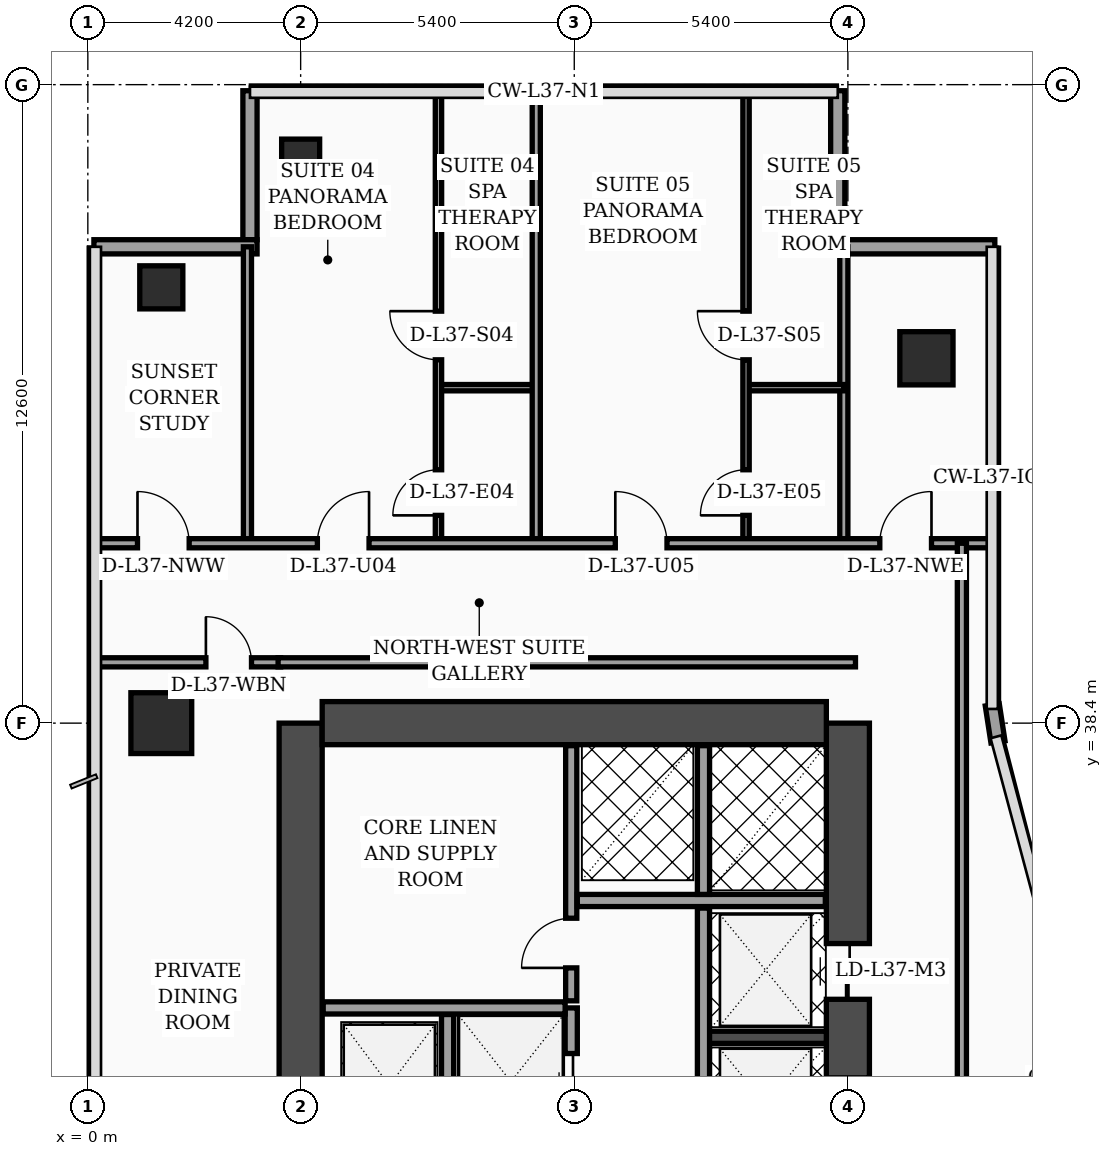
"""IFC4 building model, lengths in metres.
Left out: names, types, materials, properties, quantities, classifications, styles, units other than length and angle.
Written with IfcOpenShell. Run it as: python <this file> out.ifc"""

import sys

from ifc_helpers import new_model, si_unit, direction, frame, frame_2d, origin, origin_2d, place, context, subcontext, project, spatial, rectangle, hollow_rectangle, extrude, element, fill, save


model = new_model("IFC4")
c1 = context("Model", 3, precision=1e-05, world=origin(), true_north=direction((0.0, 1.0)))
c2 = subcontext(c1, "Body", "Model", "MODEL_VIEW")
j1 = project(units=[si_unit("LENGTHUNIT", "METRE"), si_unit("PLANEANGLEUNIT", "RADIAN")], contexts=[c1])
p1 = place(None, origin())
s1 = spatial("IfcSite", under=j1, at=p1, CompositionType="ELEMENT")
p2 = place(p1, origin())
s2 = spatial("IfcBuilding", under=s1, at=p2, CompositionType="ELEMENT")
p3 = place(p2, frame((0.0, 0.0, 152.3)))
s3 = spatial("IfcBuildingStorey", under=s2, at=p3, CompositionType="ELEMENT", Elevation=152.3)
p4 = place(p3, frame((4.2, 16.8, 0.0), z_axis=(0.0, 0.0, 1.0), x_axis=(0.0, 1.0, 0.0)))
e1 = element("IfcWall", 1, at=p4, inside=s3, PredefinedType="SHEAR", context=c2, shape_type="SweptSolid", body=[
    extrude(rectangle(XDim=21.6, YDim=0.85, at=frame_2d((10.8, 0.0))), origin(), (0.0, 0.0, 1.0), 3.56),
])
p5 = place(p3, frame((15.0, 16.8, 0.0), z_axis=(0.0, 0.0, 1.0), x_axis=(0.0, 1.0, 0.0)))
e2 = element("IfcWall", 2, at=p5, inside=s3, PredefinedType="SHEAR", context=c2, shape_type="SweptSolid", body=[
    extrude(rectangle(XDim=21.6, YDim=0.85, at=frame_2d((10.8, 0.0))), origin(), (0.0, 0.0, 1.0), 3.56),
])
p6 = place(p5, frame((8.65, 0.0, 0.0)))
e3 = element("IfcOpeningElement", 3, at=p6, cuts=e2, PredefinedType="OPENING", context=c2, shape_type="SweptSolid", body=[
    extrude(rectangle(XDim=1.1, YDim=2.2, at=frame_2d((0.55, 1.1))), frame((0.0, 0.435, 0.0), z_axis=(0.0, -1.0, 0.0), x_axis=(1.0, 0.0, 0.0)), (0.0, 0.0, 1.0), 0.87),
])
p7 = place(p5, frame((10.85, 0.0, 0.0)))
e4 = element("IfcOpeningElement", 4, at=p7, cuts=e2, PredefinedType="OPENING", context=c2, shape_type="SweptSolid", body=[
    extrude(rectangle(XDim=1.1, YDim=2.2, at=frame_2d((0.55, 1.1))), frame((0.0, 0.435, 0.0), z_axis=(0.0, -1.0, 0.0), x_axis=(1.0, 0.0, 0.0)), (0.0, 0.0, 1.0), 0.87),
])
p8 = place(p5, frame((13.5, 0.0, 0.0)))
e5 = element("IfcOpeningElement", 5, at=p8, cuts=e2, PredefinedType="OPENING", context=c2, shape_type="SweptSolid", body=[
    extrude(rectangle(XDim=1.1, YDim=2.2, at=frame_2d((0.55, 1.1))), frame((0.0, 0.435, 0.0), z_axis=(0.0, -1.0, 0.0), x_axis=(1.0, 0.0, 0.0)), (0.0, 0.0, 1.0), 0.87),
])
p9 = place(p5, frame((16.15, 0.0, 0.0)))
e6 = element("IfcOpeningElement", 6, at=p9, cuts=e2, PredefinedType="OPENING", context=c2, shape_type="SweptSolid", body=[
    extrude(rectangle(XDim=1.1, YDim=2.2, at=frame_2d((0.55, 1.1))), frame((0.0, 0.435, 0.0), z_axis=(0.0, -1.0, 0.0), x_axis=(1.0, 0.0, 0.0)), (0.0, 0.0, 1.0), 0.87),
])
p10 = place(p3, frame((4.625, 38.4, 0.0), z_axis=(0.0, 0.0, 1.0), x_axis=(1.0, 0.0, 0.0)))
e7 = element("IfcWall", 7, at=p10, inside=s3, PredefinedType="SHEAR", context=c2, shape_type="SweptSolid", body=[
    extrude(rectangle(XDim=9.95, YDim=0.85, at=frame_2d((4.975, 0.0))), origin(), (0.0, 0.0, 1.0), 3.56),
])
p11 = place(p3, frame((12.18, 32.2, 0.0), z_axis=(0.0, 0.0, 1.0), x_axis=(1.0, 0.0, 0.0)))
e8 = element("IfcWall", 8, at=p11, inside=s3, PredefinedType="SOLIDWALL", context=c2, shape_type="SweptSolid", body=[
    extrude(rectangle(XDim=2.395, YDim=0.24, at=frame_2d((1.198, 0.0))), origin(), (0.0, 0.0, 1.0), 3.56),
])
p12 = place(p3, frame((1.45, 38.4, 0.0), z_axis=(0.0, 0.0, 1.0), x_axis=(1.0, 0.0, 0.0)))
e9 = element("IfcColumn", 9, at=p12, inside=s3, PredefinedType="COLUMN", context=c2, shape_type="SweptSolid", body=[
    extrude(rectangle(XDim=1.2, YDim=1.2, at=origin_2d()), origin(), (0.0, 0.0, 1.0), 3.56),
])
p13 = place(p3, frame((1.45, 47.0, 0.0), z_axis=(0.0, 0.0, 1.0), x_axis=(1.0, 0.0, 0.0)))
e10 = element("IfcColumn", 10, at=p13, inside=s3, PredefinedType="COLUMN", context=c2, shape_type="SweptSolid", body=[
    extrude(hollow_rectangle(XDim=0.85, YDim=0.85, WallThickness=0.036, at=origin_2d()), origin(), (0.0, 0.0, 1.0), 3.56),
])
p14 = place(p3, frame((4.2, 49.55, 0.0), z_axis=(0.0, 0.0, 1.0), x_axis=(1.0, 0.0, 0.0)))
e11 = element("IfcColumn", 11, at=p14, inside=s3, PredefinedType="COLUMN", context=c2, shape_type="SweptSolid", body=[
    extrude(hollow_rectangle(XDim=0.75, YDim=0.75, WallThickness=0.032, at=origin_2d()), origin(), (0.0, 0.0, 1.0), 3.56),
])
p15 = place(p3, frame((16.55, 45.6, 0.0), z_axis=(0.0, 0.0, 1.0), x_axis=(1.0, 0.0, 0.0)))
e12 = element("IfcColumn", 12, at=p15, inside=s3, PredefinedType="COLUMN", context=c2, shape_type="SweptSolid", body=[
    extrude(rectangle(XDim=1.05, YDim=1.05, at=origin_2d()), origin(), (0.0, 0.0, 1.0), 3.56),
])
p16 = place(p3, frame((17.962, 38.03, 0.0), z_axis=(0.0, 0.0, 1.0), x_axis=(-0.15141125477, 0.988470855377, 0.0)))
e13 = element("IfcWall", 13, at=p16, inside=s3, PredefinedType="SOLIDWALL", context=c2, shape_type="SweptSolid", body=[
    extrude(rectangle(XDim=0.739, YDim=0.28, at=frame_2d((0.369, 0.0))), origin(), (0.0, 0.0, 1.0), 3.56),
])
p17 = place(p3, frame((17.9, 47.8, 0.0), z_axis=(0.0, 0.0, 1.0), x_axis=(-1.0, 0.0, 0.0)))
e14 = element("IfcWall", 14, at=p17, inside=s3, PredefinedType="SOLIDWALL", context=c2, shape_type="SweptSolid", body=[
    extrude(rectangle(XDim=3.24, YDim=0.28, at=frame_2d((1.62, 0.0))), origin(), (0.0, 0.0, 1.0), 3.56),
])
p18 = place(p3, frame((14.8, 47.94, 0.0), z_axis=(0.0, 0.0, 1.0), x_axis=(0.0, 1.0, 0.0)))
e15 = element("IfcWall", 15, at=p18, inside=s3, PredefinedType="SOLIDWALL", context=c2, shape_type="SweptSolid", body=[
    extrude(rectangle(XDim=2.94, YDim=0.28, at=frame_2d((1.47, 0.0))), origin(), (0.0, 0.0, 1.0), 3.56),
])
p19 = place(p3, frame((3.2, 50.88, 0.0), z_axis=(0.0, 0.0, 1.0), x_axis=(0.0, -1.0, 0.0)))
e16 = element("IfcWall", 16, at=p19, inside=s3, PredefinedType="SOLIDWALL", context=c2, shape_type="SweptSolid", body=[
    extrude(rectangle(XDim=2.94, YDim=0.28, at=frame_2d((1.47, 0.0))), origin(), (0.0, 0.0, 1.0), 3.04),
])
p20 = place(p3, frame((3.34, 47.8, 0.0), z_axis=(0.0, 0.0, 1.0), x_axis=(-1.0, 0.0, 0.0)))
e17 = element("IfcWall", 17, at=p20, inside=s3, PredefinedType="SOLIDWALL", context=c2, shape_type="SweptSolid", body=[
    extrude(rectangle(XDim=3.22, YDim=0.28, at=frame_2d((1.61, 0.0))), origin(), (0.0, 0.0, 1.0), 3.04),
])
p21 = place(p3, frame((7.1, 30.02, 0.0), z_axis=(0.0, 0.0, 1.0), x_axis=(0.0, 1.0, 0.0)))
e18 = element("IfcWall", 18, at=p21, inside=s3, PredefinedType="SOLIDWALL", context=c2, shape_type="SweptSolid", body=[
    extrude(rectangle(XDim=2.63, YDim=0.24, at=frame_2d((1.315, 0.0))), origin(), (0.0, 0.0, 1.0), 3.56),
])
p22 = place(p3, frame((9.54, 29.88, 0.0), z_axis=(0.0, 0.0, 1.0), x_axis=(0.0, 1.0, 0.0)))
e19 = element("IfcWall", 19, at=p22, inside=s3, PredefinedType="SOLIDWALL", context=c2, shape_type="SweptSolid", body=[
    extrude(rectangle(XDim=2.9, YDim=0.24, at=frame_2d((1.45, 0.0))), origin(), (0.0, 0.0, 1.0), 3.56),
])
p23 = place(p22, frame((0.7, 0.0, 0.0)))
e20 = element("IfcOpeningElement", 20, at=p23, cuts=e19, PredefinedType="OPENING", context=c2, shape_type="SweptSolid", body=[
    extrude(rectangle(XDim=1.3, YDim=2.35, at=frame_2d((0.65, 1.175))), frame((0.0, 0.13, 0.0), z_axis=(0.0, -1.0, 0.0), x_axis=(1.0, 0.0, 0.0)), (0.0, 0.0, 1.0), 0.26),
])
p24 = place(p3, frame((4.645, 32.78, 0.0), z_axis=(0.0, 0.0, 1.0), x_axis=(1.0, 0.0, 0.0)))
e21 = element("IfcWall", 21, at=p24, inside=s3, PredefinedType="SOLIDWALL", context=c2, shape_type="SweptSolid", body=[
    extrude(rectangle(XDim=4.775, YDim=0.24, at=frame_2d((2.387, 0.0))), origin(), (0.0, 0.0, 1.0), 3.19),
])
p25 = place(p3, frame((9.54, 32.92, 0.0), z_axis=(0.0, 0.0, 1.0), x_axis=(0.0, 1.0, 0.0)))
e22 = element("IfcWall", 22, at=p25, inside=s3, PredefinedType="SOLIDWALL", context=c2, shape_type="SweptSolid", body=[
    extrude(rectangle(XDim=5.035, YDim=0.22, at=frame_2d((2.518, 0.0))), origin(), (0.0, 0.0, 1.0), 3.56),
])
p26 = place(p25, frame((0.65, 0.0, 0.0)))
e23 = element("IfcOpeningElement", 23, at=p26, cuts=e22, PredefinedType="OPENING", context=c2, shape_type="SweptSolid", body=[
    extrude(rectangle(XDim=0.98, YDim=2.15, at=frame_2d((0.49, 1.075))), frame((0.0, 0.12, 0.0), z_axis=(0.0, -1.0, 0.0), x_axis=(1.0, 0.0, 0.0)), (0.0, 0.0, 1.0), 0.24),
])
p27 = place(p3, frame((12.15, 27.0, 0.0), z_axis=(0.0, 0.0, 1.0), x_axis=(0.0, 1.0, 0.0)))
e24 = element("IfcWall", 24, at=p27, inside=s3, PredefinedType="SOLIDWALL", context=c2, shape_type="SweptSolid", body=[
    extrude(rectangle(XDim=7.75, YDim=0.24, at=frame_2d((3.875, 0.0))), origin(), (0.0, 0.0, 1.0), 3.56),
])
p28 = place(p3, frame((9.66, 34.9, 0.0), z_axis=(0.0, 0.0, 1.0), x_axis=(1.0, 0.0, 0.0)))
e25 = element("IfcWall", 25, at=p28, inside=s3, PredefinedType="SOLIDWALL", context=c2, shape_type="SweptSolid", body=[
    extrude(rectangle(XDim=4.895, YDim=0.24, at=frame_2d((2.448, 0.0))), origin(), (0.0, 0.0, 1.0), 3.56),
])
p29 = place(p3, frame((12.15, 35.02, 0.0), z_axis=(0.0, 0.0, 1.0), x_axis=(0.0, 1.0, 0.0)))
e26 = element("IfcWall", 26, at=p29, inside=s3, PredefinedType="SOLIDWALL", context=c2, shape_type="SweptSolid", body=[
    extrude(rectangle(XDim=2.935, YDim=0.24, at=frame_2d((1.468, 0.0))), origin(), (0.0, 0.0, 1.0), 3.56),
])
p30 = place(p3, frame((0.08, 39.6, 0.0), z_axis=(0.0, 0.0, 1.0), x_axis=(1.0, 0.0, 0.0)))
e27 = element("IfcWall", 27, at=p30, inside=s3, PredefinedType="PARTITIONING", context=c2, shape_type="SweptSolid", body=[
    extrude(rectangle(XDim=3.725, YDim=0.18, at=frame_2d((1.862, 0.0))), origin(), (0.0, 0.0, 1.0), 2.94),
])
p31 = place(p30, frame((2.25, 0.0, 0.0)))
e28 = element("IfcOpeningElement", 28, at=p31, cuts=e27, PredefinedType="OPENING", context=c2, shape_type="SweptSolid", body=[
    extrude(rectangle(XDim=0.9, YDim=2.15, at=frame_2d((0.45, 1.075))), frame((0.0, 0.1, 0.0), z_axis=(0.0, -1.0, 0.0), x_axis=(1.0, 0.0, 0.0)), (0.0, 0.0, 1.0), 0.2),
])
p32 = place(p3, frame((3.15, 41.95, 0.0), z_axis=(0.0, 0.0, 1.0), x_axis=(0.0, 1.0, 0.0)))
e29 = element("IfcWall", 29, at=p32, inside=s3, PredefinedType="PARTITIONING", context=c2, shape_type="SweptSolid", body=[
    extrude(rectangle(XDim=5.85, YDim=0.16, at=frame_2d((2.925, 0.0))), origin(), (0.0, 0.0, 1.0), 3.14),
])
p33 = place(p3, frame((14.92, 41.95, 0.0), z_axis=(0.0, 0.0, 1.0), x_axis=(0.0, 1.0, 0.0)))
e30 = element("IfcWall", 30, at=p33, inside=s3, PredefinedType="PARTITIONING", context=c2, shape_type="SweptSolid", body=[
    extrude(rectangle(XDim=5.85, YDim=0.16, at=frame_2d((2.925, 0.0))), origin(), (0.0, 0.0, 1.0), 3.04),
])
p34 = place(p3, frame((6.92, 45.02, 0.0), z_axis=(0.0, 0.0, 1.0), x_axis=(1.0, 0.0, 0.0)))
e31 = element("IfcWall", 31, at=p34, inside=s3, PredefinedType="PARTITIONING", context=c2, shape_type="SweptSolid", body=[
    extrude(rectangle(XDim=1.93, YDim=0.125, at=frame_2d((0.965, 0.0))), origin(), (0.0, 0.0, 1.0), 3.56),
])
p35 = place(p3, frame((6.92, 41.95, 0.0), z_axis=(0.0, 0.0, 1.0), x_axis=(0.0, 1.0, 0.0)))
e32 = element("IfcWall", 32, at=p35, inside=s3, PredefinedType="PARTITIONING", context=c2, shape_type="SweptSolid", body=[
    extrude(rectangle(XDim=8.99, YDim=0.125, at=frame_2d((4.495, 0.0))), origin(), (0.0, 0.0, 1.0), 3.04),
])
p36 = place(p35, frame((0.55, 0.0, 0.0)))
e33 = element("IfcOpeningElement", 33, at=p36, cuts=e32, PredefinedType="OPENING", context=c2, shape_type="SweptSolid", body=[
    extrude(rectangle(XDim=0.9, YDim=2.15, at=frame_2d((0.45, 1.075))), frame((0.0, 0.073, 0.0), z_axis=(0.0, -1.0, 0.0), x_axis=(1.0, 0.0, 0.0)), (0.0, 0.0, 1.0), 0.145),
])
p37 = place(p35, frame((3.62, 0.0, 0.0)))
e34 = element("IfcOpeningElement", 34, at=p37, cuts=e32, PredefinedType="OPENING", context=c2, shape_type="SweptSolid", body=[
    extrude(rectangle(XDim=0.96, YDim=2.2, at=frame_2d((0.48, 1.1))), frame((0.0, 0.073, 0.0), z_axis=(0.0, -1.0, 0.0), x_axis=(1.0, 0.0, 0.0)), (0.0, 0.0, 1.0), 0.145),
])
p38 = place(p3, frame((12.99, 45.02, 0.0), z_axis=(0.0, 0.0, 1.0), x_axis=(1.0, 0.0, 0.0)))
e35 = element("IfcWall", 35, at=p38, inside=s3, PredefinedType="PARTITIONING", context=c2, shape_type="SweptSolid", body=[
    extrude(rectangle(XDim=1.93, YDim=0.125, at=frame_2d((0.965, 0.0))), origin(), (0.0, 0.0, 1.0), 3.56),
])
p39 = place(p3, frame((12.99, 41.95, 0.0), z_axis=(0.0, 0.0, 1.0), x_axis=(0.0, 1.0, 0.0)))
e36 = element("IfcWall", 36, at=p39, inside=s3, PredefinedType="PARTITIONING", context=c2, shape_type="SweptSolid", body=[
    extrude(rectangle(XDim=8.99, YDim=0.125, at=frame_2d((4.495, 0.0))), origin(), (0.0, 0.0, 1.0), 3.04),
])
p40 = place(p39, frame((0.55, 0.0, 0.0)))
e37 = element("IfcOpeningElement", 37, at=p40, cuts=e36, PredefinedType="OPENING", context=c2, shape_type="SweptSolid", body=[
    extrude(rectangle(XDim=0.9, YDim=2.15, at=frame_2d((0.45, 1.075))), frame((0.0, 0.073, 0.0), z_axis=(0.0, -1.0, 0.0), x_axis=(1.0, 0.0, 0.0)), (0.0, 0.0, 1.0), 0.145),
])
p41 = place(p39, frame((3.62, 0.0, 0.0)))
e38 = element("IfcOpeningElement", 38, at=p41, cuts=e36, PredefinedType="OPENING", context=c2, shape_type="SweptSolid", body=[
    extrude(rectangle(XDim=0.96, YDim=2.2, at=frame_2d((0.48, 1.1))), frame((0.0, 0.073, 0.0), z_axis=(0.0, -1.0, 0.0), x_axis=(1.0, 0.0, 0.0)), (0.0, 0.0, 1.0), 0.145),
])
p42 = place(p3, frame((8.85, 41.95, 0.0), z_axis=(0.0, 0.0, 1.0), x_axis=(0.0, 1.0, 0.0)))
e39 = element("IfcWall", 39, at=p42, inside=s3, PredefinedType="PARTITIONING", context=c2, shape_type="SweptSolid", body=[
    extrude(rectangle(XDim=8.99, YDim=0.16, at=frame_2d((4.495, 0.0))), origin(), (0.0, 0.0, 1.0), 3.04),
])
p43 = place(p3, frame((0.08, 41.95, 0.0), z_axis=(0.0, 0.0, 1.0), x_axis=(1.0, 0.0, 0.0)))
e40 = element("IfcWall", 40, at=p43, inside=s3, PredefinedType="PARTITIONING", context=c2, shape_type="SweptSolid", body=[
    extrude(rectangle(XDim=17.77, YDim=0.18, at=frame_2d((8.885, 0.0))), origin(), (0.0, 0.0, 1.0), 2.94),
])
p44 = place(p43, frame((0.9, 0.0, 0.0)))
e41 = element("IfcOpeningElement", 41, at=p44, cuts=e40, PredefinedType="OPENING", context=c2, shape_type="SweptSolid", body=[
    extrude(rectangle(XDim=1.02, YDim=2.2, at=frame_2d((0.51, 1.1))), frame((0.0, 0.1, 0.0), z_axis=(0.0, -1.0, 0.0), x_axis=(1.0, 0.0, 0.0)), (0.0, 0.0, 1.0), 0.2),
])
p45 = place(p43, frame((4.45, 0.0, 0.0)))
e42 = element("IfcOpeningElement", 42, at=p45, cuts=e40, PredefinedType="OPENING", context=c2, shape_type="SweptSolid", body=[
    extrude(rectangle(XDim=1.02, YDim=2.2, at=frame_2d((0.51, 1.1))), frame((0.0, 0.1, 0.0), z_axis=(0.0, -1.0, 0.0), x_axis=(1.0, 0.0, 0.0)), (0.0, 0.0, 1.0), 0.2),
])
p46 = place(p43, frame((10.33, 0.0, 0.0)))
e43 = element("IfcOpeningElement", 43, at=p46, cuts=e40, PredefinedType="OPENING", context=c2, shape_type="SweptSolid", body=[
    extrude(rectangle(XDim=1.02, YDim=2.2, at=frame_2d((0.51, 1.1))), frame((0.0, 0.1, 0.0), z_axis=(0.0, -1.0, 0.0), x_axis=(1.0, 0.0, 0.0)), (0.0, 0.0, 1.0), 0.2),
])
p47 = place(p43, frame((15.55, 0.0, 0.0)))
e44 = element("IfcOpeningElement", 44, at=p47, cuts=e40, PredefinedType="OPENING", context=c2, shape_type="SweptSolid", body=[
    extrude(rectangle(XDim=1.02, YDim=2.2, at=frame_2d((0.51, 1.1))), frame((0.0, 0.1, 0.0), z_axis=(0.0, -1.0, 0.0), x_axis=(1.0, 0.0, 0.0)), (0.0, 0.0, 1.0), 0.2),
])
p48 = place(p3, frame((17.25, 24.3, 0.0), z_axis=(0.0, 0.0, 1.0), x_axis=(0.0, 1.0, 0.0)))
e45 = element("IfcWall", 45, at=p48, inside=s3, PredefinedType="PARTITIONING", context=c2, shape_type="SweptSolid", body=[
    extrude(rectangle(XDim=17.65, YDim=0.18, at=frame_2d((8.825, 0.0))), origin(), (0.0, 0.0, 1.0), 2.94),
])
p49 = place(p3, frame((3.755, 39.6, 0.0), z_axis=(0.0, 0.0, 1.0), x_axis=(1.0, 0.0, 0.0)))
e46 = element("IfcWall", 46, at=p49, inside=s3, PredefinedType="PARTITIONING", context=c2, shape_type="SweptSolid", body=[
    extrude(rectangle(XDim=11.395, YDim=0.18, at=frame_2d((5.698, 0.0))), origin(), (0.0, 0.0, 1.0), 2.94),
])
p50 = place(p23, origin())
e47 = element("IfcDoor", 47, at=p50, inside=s3, OperationType="DOUBLE_DOOR_SLIDING", PredefinedType="DOOR", context=c2, shape_type="SweptSolid", body=[
    extrude(rectangle(XDim=1.3, YDim=2.35, at=frame_2d((0.65, 1.175))), frame((0.0, 0.025, 0.0), z_axis=(0.0, -1.0, 0.0), x_axis=(1.0, 0.0, 0.0)), (0.0, 0.0, 1.0), 0.05),
])
fill(e20, e47)
p51 = place(p26, origin())
e48 = element("IfcDoor", 48, at=p51, inside=s3, OperationType="SINGLE_SWING_LEFT", PredefinedType="DOOR", context=c2, shape_type="SweptSolid", body=[
    extrude(rectangle(XDim=0.98, YDim=2.15, at=frame_2d((0.49, 1.075))), frame((0.0, 0.025, 0.0), z_axis=(0.0, -1.0, 0.0), x_axis=(1.0, 0.0, 0.0)), (0.0, 0.0, 1.0), 0.05),
])
fill(e23, e48)
p52 = place(p31, origin())
e49 = element("IfcDoor", 49, at=p52, inside=s3, OperationType="SINGLE_SWING_LEFT", PredefinedType="DOOR", context=c2, shape_type="SweptSolid", body=[
    extrude(rectangle(XDim=0.9, YDim=2.15, at=frame_2d((0.45, 1.075))), frame((0.0, 0.025, 0.0), z_axis=(0.0, -1.0, 0.0), x_axis=(1.0, 0.0, 0.0)), (0.0, 0.0, 1.0), 0.05),
])
fill(e28, e49)
p53 = place(p36, origin())
e50 = element("IfcDoor", 50, at=p53, inside=s3, OperationType="SINGLE_SWING_LEFT", PredefinedType="DOOR", context=c2, shape_type="SweptSolid", body=[
    extrude(rectangle(XDim=0.9, YDim=2.15, at=frame_2d((0.45, 1.075))), frame((0.0, 0.025, 0.0), z_axis=(0.0, -1.0, 0.0), x_axis=(1.0, 0.0, 0.0)), (0.0, 0.0, 1.0), 0.05),
])
fill(e33, e50)
p54 = place(p37, origin())
e51 = element("IfcDoor", 51, at=p54, inside=s3, OperationType="SINGLE_SWING_RIGHT", PredefinedType="DOOR", context=c2, shape_type="SweptSolid", body=[
    extrude(rectangle(XDim=0.96, YDim=2.2, at=frame_2d((0.48, 1.1))), frame((0.0, 0.025, 0.0), z_axis=(0.0, -1.0, 0.0), x_axis=(1.0, 0.0, 0.0)), (0.0, 0.0, 1.0), 0.05),
])
fill(e34, e51)
p55 = place(p40, origin())
e52 = element("IfcDoor", 52, at=p55, inside=s3, OperationType="SINGLE_SWING_LEFT", PredefinedType="DOOR", context=c2, shape_type="SweptSolid", body=[
    extrude(rectangle(XDim=0.9, YDim=2.15, at=frame_2d((0.45, 1.075))), frame((0.0, 0.025, 0.0), z_axis=(0.0, -1.0, 0.0), x_axis=(1.0, 0.0, 0.0)), (0.0, 0.0, 1.0), 0.05),
])
fill(e37, e52)
p56 = place(p41, origin())
e53 = element("IfcDoor", 53, at=p56, inside=s3, OperationType="SINGLE_SWING_RIGHT", PredefinedType="DOOR", context=c2, shape_type="SweptSolid", body=[
    extrude(rectangle(XDim=0.96, YDim=2.2, at=frame_2d((0.48, 1.1))), frame((0.0, 0.025, 0.0), z_axis=(0.0, -1.0, 0.0), x_axis=(1.0, 0.0, 0.0)), (0.0, 0.0, 1.0), 0.05),
])
fill(e38, e53)
p57 = place(p44, origin())
e54 = element("IfcDoor", 54, at=p57, inside=s3, OperationType="SINGLE_SWING_LEFT", PredefinedType="DOOR", context=c2, shape_type="SweptSolid", body=[
    extrude(rectangle(XDim=1.02, YDim=2.2, at=frame_2d((0.51, 1.1))), frame((0.0, 0.025, 0.0), z_axis=(0.0, -1.0, 0.0), x_axis=(1.0, 0.0, 0.0)), (0.0, 0.0, 1.0), 0.05),
])
fill(e41, e54)
p58 = place(p45, origin())
e55 = element("IfcDoor", 55, at=p58, inside=s3, OperationType="SINGLE_SWING_RIGHT", PredefinedType="DOOR", context=c2, shape_type="SweptSolid", body=[
    extrude(rectangle(XDim=1.02, YDim=2.2, at=frame_2d((0.51, 1.1))), frame((0.0, 0.025, 0.0), z_axis=(0.0, -1.0, 0.0), x_axis=(1.0, 0.0, 0.0)), (0.0, 0.0, 1.0), 0.05),
])
fill(e42, e55)
p59 = place(p46, origin())
e56 = element("IfcDoor", 56, at=p59, inside=s3, OperationType="SINGLE_SWING_LEFT", PredefinedType="DOOR", context=c2, shape_type="SweptSolid", body=[
    extrude(rectangle(XDim=1.02, YDim=2.2, at=frame_2d((0.51, 1.1))), frame((0.0, 0.025, 0.0), z_axis=(0.0, -1.0, 0.0), x_axis=(1.0, 0.0, 0.0)), (0.0, 0.0, 1.0), 0.05),
])
fill(e43, e56)
p60 = place(p47, origin())
e57 = element("IfcDoor", 57, at=p60, inside=s3, OperationType="SINGLE_SWING_RIGHT", PredefinedType="DOOR", context=c2, shape_type="SweptSolid", body=[
    extrude(rectangle(XDim=1.02, YDim=2.2, at=frame_2d((0.51, 1.1))), frame((0.0, 0.025, 0.0), z_axis=(0.0, -1.0, 0.0), x_axis=(1.0, 0.0, 0.0)), (0.0, 0.0, 1.0), 0.05),
])
fill(e44, e57)
p61 = place(p9, origin())
e58 = element("IfcDoor", 58, at=p61, inside=s3, OperationType="DOUBLE_DOOR_SLIDING", PredefinedType="DOOR", context=c2, shape_type="SweptSolid", body=[
    extrude(rectangle(XDim=1.1, YDim=2.2, at=frame_2d((0.55, 1.1))), frame((0.0, 0.025, 0.0), z_axis=(0.0, -1.0, 0.0), x_axis=(1.0, 0.0, 0.0)), (0.0, 0.0, 1.0), 0.05),
])
fill(e6, e58)
save(model, sys.argv[1])
